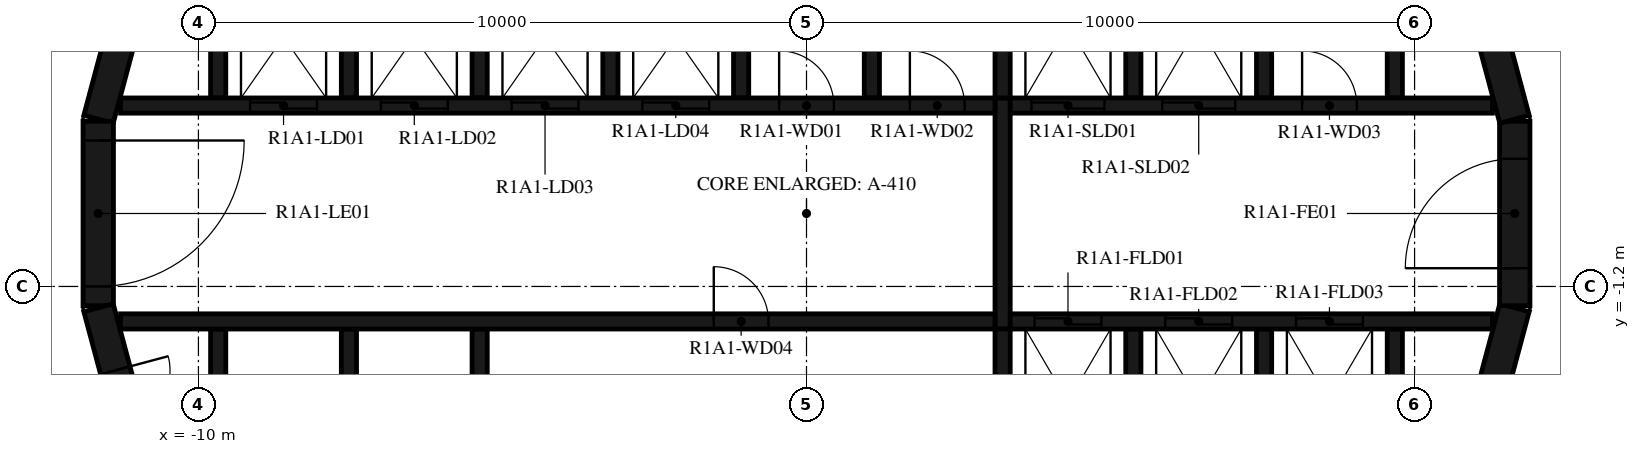
"""IFC4 building model, lengths in metres.
Left out: names, types, materials, properties, quantities, classifications, styles, units other than length and angle.
Written with IfcOpenShell. Run it as: python <this file> out.ifc"""

import sys

from ifc_helpers import new_model, si_unit, direction, frame, frame_2d, origin, place, context, subcontext, project, spatial, polyline, rectangle, outline, extrude, element, fill, save


model = new_model("IFC4")
c1 = context("Model", 3, precision=1e-05, world=origin(), true_north=direction((0.0, 1.0)))
c2 = subcontext(c1, "Body", "Model", "MODEL_VIEW")
j1 = project(units=[si_unit("LENGTHUNIT", "METRE"), si_unit("PLANEANGLEUNIT", "RADIAN")], contexts=[c1])
p1 = place(None, origin())
s1 = spatial("IfcSite", under=j1, at=p1, CompositionType="ELEMENT")
p2 = place(p1, origin())
s2 = spatial("IfcBuilding", under=s1, at=p2, CompositionType="ELEMENT")
p3 = place(p2, frame((0.0, 0.0, 41.9)))
s3 = spatial("IfcBuildingStorey", under=s2, at=p3, CompositionType="ELEMENT", Elevation=41.9)
p4 = place(p3, frame((10.858, -4.479, 0.0), z_axis=(0.0, 0.0, 1.0), x_axis=(0.258734743916, 0.965948410781, 0.0)))
e1 = element("IfcWall", 1, at=p4, inside=s3, PredefinedType="SHEAR", context=c2, shape_type="SweptSolid", body=[
    extrude(rectangle(XDim=3.033, YDim=0.5, at=frame_2d((1.516, 0.0))), origin(), (0.0, 0.0, 1.0), 3.12),
])
p5 = place(p3, frame((11.647, -1.516, 0.0), z_axis=(0.0, 0.0, 1.0), x_axis=(0.0, 1.0, 0.0)))
e2 = element("IfcWall", 2, at=p5, inside=s3, PredefinedType="SHEAR", context=c2, shape_type="SweptSolid", body=[
    extrude(rectangle(XDim=3.033, YDim=0.5, at=frame_2d((1.516, 0.0))), origin(), (0.0, 0.0, 1.0), 3.12),
])
p6 = place(p5, frame((0.616, 0.0, 0.0)))
e3 = element("IfcOpeningElement", 3, at=p6, cuts=e2, PredefinedType="OPENING", context=c2, shape_type="SweptSolid", body=[
    extrude(rectangle(XDim=1.8, YDim=2.1, at=frame_2d((0.9, 1.05))), frame((0.0, 0.26, 0.0), z_axis=(0.0, -1.0, 0.0), x_axis=(1.0, 0.0, 0.0)), (0.0, 0.0, 1.0), 0.52),
])
for number, where, z_axis, x_axis in (
    (4, (11.643, 1.55, 0.0), (0.0, 0.0, 1.0), (-0.259, 0.966, 0.0)),
    (5, (-10.858, 4.479, 0.0), (0.0, 0.0, 1.0), (-0.259, -0.966, 0.0)),
):
    element("IfcWall", number, at=place(p3, frame(where, z_axis=z_axis, x_axis=x_axis)), inside=s3, PredefinedType="SHEAR", context=c2, shape_type="SweptSolid", body=[
        extrude(rectangle(XDim=3.033, YDim=0.5, at=frame_2d((1.516, 0.0))), origin(), (0.0, 0.0, 1.0), 3.12),
    ])
p7 = place(p3, frame((-11.647, 1.516, 0.0), z_axis=(0.0, 0.0, 1.0), x_axis=(0.0, -1.0, 0.0)))
e6 = element("IfcWall", 6, at=p7, inside=s3, PredefinedType="SHEAR", context=c2, shape_type="SweptSolid", body=[
    extrude(rectangle(XDim=3.033, YDim=0.5, at=frame_2d((1.516, 0.0))), origin(), (0.0, 0.0, 1.0), 3.12),
])
p8 = place(p7, frame((0.316, 0.0, 0.0)))
e7 = element("IfcOpeningElement", 7, at=p8, cuts=e6, PredefinedType="OPENING", context=c2, shape_type="SweptSolid", body=[
    extrude(rectangle(XDim=2.4, YDim=2.1, at=frame_2d((1.2, 1.05))), frame((0.0, 0.26, 0.0), z_axis=(0.0, -1.0, 0.0), x_axis=(1.0, 0.0, 0.0)), (0.0, 0.0, 1.0), 0.52),
])
p9 = place(p3, frame((-11.643, -1.55, 0.0), z_axis=(0.0, 0.0, 1.0), x_axis=(0.258734743916, -0.965948410781, 0.0)))
e8 = element("IfcWall", 8, at=p9, inside=s3, PredefinedType="SHEAR", context=c2, shape_type="SweptSolid", body=[
    extrude(rectangle(XDim=3.033, YDim=0.5, at=frame_2d((1.516, 0.0))), origin(), (0.0, 0.0, 1.0), 3.12),
])
p10 = place(p9, frame((1.066, 0.0, 0.0)))
e9 = element("IfcOpeningElement", 9, at=p10, cuts=e8, PredefinedType="OPENING", context=c2, shape_type="SweptSolid", body=[
    extrude(rectangle(XDim=0.9, YDim=2.1, at=frame_2d((0.45, 1.05))), frame((0.0, 0.26, 0.0), z_axis=(0.0, -1.0, 0.0), x_axis=(1.0, 0.0, 0.0)), (0.0, 0.0, 1.0), 0.52),
])
p11 = place(p3, origin())
e10 = element("IfcWall", 10, at=p11, inside=s3, PredefinedType="SHEAR", context=c2, shape_type="SweptSolid", body=[
    extrude(outline(polyline([(-9.55, 4.8), (-7.65, 4.8), (-7.65, 1.9), (-7.4, 1.9), (-7.4, 4.8), (-5.5, 4.8), (-5.5, 1.9), (-5.25, 1.9), (-5.25, 4.8), (-3.35, 4.8), (-3.35, 1.9), (-3.1, 1.9), (-3.1, 4.8), (-1.2, 4.8), (-1.2, 1.9), (-0.95, 1.9), (-0.95, 4.8), (0.95, 4.8), (0.95, 1.9), (1.2, 1.9), (1.2, 4.8), (3.1, 4.8), (3.1, 1.9), (3.35, 1.9), (3.35, 4.8), (5.25, 4.8), (5.25, 1.9), (5.5, 1.9), (5.5, 4.8), (7.4, 4.8), (7.4, 1.9), (7.65, 1.9), (7.65, 4.8), (9.55, 4.8), (9.55, 1.9), (9.8, 1.9), (9.8, 4.8), (9.8, 5.05), (-9.8, 5.05), (-9.8, 4.8), (-9.8, 1.9), (-9.55, 1.9), (-9.55, 4.8)])), origin(), (0.0, 0.0, 1.0), 3.12),
])
p12 = place(p3, origin())
e11 = element("IfcWall", 11, at=p12, inside=s3, PredefinedType="SHEAR", context=c2, shape_type="SweptSolid", body=[
    extrude(outline(polyline([(9.8, -5.05), (9.8, -4.8), (9.8, -1.9), (9.55, -1.9), (9.55, -4.8), (7.65, -4.8), (7.65, -1.9), (7.4, -1.9), (7.4, -4.8), (5.5, -4.8), (5.5, -1.9), (5.25, -1.9), (5.25, -4.8), (3.35, -4.8), (3.35, -1.9), (3.1, -1.9), (3.1, -4.8), (-5.25, -4.8), (-5.25, -1.9), (-5.5, -1.9), (-5.5, -4.8), (-7.4, -4.8), (-7.4, -1.9), (-7.65, -1.9), (-7.65, -4.8), (-9.55, -4.8), (-9.55, -1.9), (-9.8, -1.9), (-9.8, -4.8), (-9.8, -5.05), (9.8, -5.05)])), origin(), (0.0, 0.0, 1.0), 3.12),
])
p13 = place(p3, frame((-11.28, 1.775, 0.0), z_axis=(0.0, 0.0, 1.0), x_axis=(1.0, 0.0, 0.0)))
e12 = element("IfcWall", 12, at=p13, inside=s3, PredefinedType="SHEAR", context=c2, shape_type="SweptSolid", body=[
    extrude(rectangle(XDim=14.38, YDim=0.25, at=frame_2d((7.19, 0.0))), origin(), (0.0, 0.0, 1.0), 3.12),
])
p14 = place(p13, frame((2.13, 0.0, 0.0)))
e13 = element("IfcOpeningElement", 13, at=p14, cuts=e12, PredefinedType="OPENING", context=c2, shape_type="SweptSolid", body=[
    extrude(rectangle(XDim=1.1, YDim=2.1, at=frame_2d((0.55, 1.05))), frame((0.0, 0.135, 0.0), z_axis=(0.0, -1.0, 0.0), x_axis=(1.0, 0.0, 0.0)), (0.0, 0.0, 1.0), 0.27),
])
p15 = place(p13, frame((4.28, 0.0, 0.0)))
e14 = element("IfcOpeningElement", 14, at=p15, cuts=e12, PredefinedType="OPENING", context=c2, shape_type="SweptSolid", body=[
    extrude(rectangle(XDim=1.1, YDim=2.1, at=frame_2d((0.55, 1.05))), frame((0.0, 0.135, 0.0), z_axis=(0.0, -1.0, 0.0), x_axis=(1.0, 0.0, 0.0)), (0.0, 0.0, 1.0), 0.27),
])
p16 = place(p13, frame((6.43, 0.0, 0.0)))
e15 = element("IfcOpeningElement", 15, at=p16, cuts=e12, PredefinedType="OPENING", context=c2, shape_type="SweptSolid", body=[
    extrude(rectangle(XDim=1.1, YDim=2.1, at=frame_2d((0.55, 1.05))), frame((0.0, 0.135, 0.0), z_axis=(0.0, -1.0, 0.0), x_axis=(1.0, 0.0, 0.0)), (0.0, 0.0, 1.0), 0.27),
])
p17 = place(p13, frame((8.58, 0.0, 0.0)))
e16 = element("IfcOpeningElement", 16, at=p17, cuts=e12, PredefinedType="OPENING", context=c2, shape_type="SweptSolid", body=[
    extrude(rectangle(XDim=1.1, YDim=2.1, at=frame_2d((0.55, 1.05))), frame((0.0, 0.135, 0.0), z_axis=(0.0, -1.0, 0.0), x_axis=(1.0, 0.0, 0.0)), (0.0, 0.0, 1.0), 0.27),
])
p18 = place(p13, frame((10.83, 0.0, 0.0)))
e17 = element("IfcOpeningElement", 17, at=p18, cuts=e12, PredefinedType="OPENING", context=c2, shape_type="SweptSolid", body=[
    extrude(rectangle(XDim=0.9, YDim=2.1, at=frame_2d((0.45, 1.05))), frame((0.0, 0.135, 0.0), z_axis=(0.0, -1.0, 0.0), x_axis=(1.0, 0.0, 0.0)), (0.0, 0.0, 1.0), 0.27),
])
p19 = place(p13, frame((12.98, 0.0, 0.0)))
e18 = element("IfcOpeningElement", 18, at=p19, cuts=e12, PredefinedType="OPENING", context=c2, shape_type="SweptSolid", body=[
    extrude(rectangle(XDim=0.9, YDim=2.1, at=frame_2d((0.45, 1.05))), frame((0.0, 0.135, 0.0), z_axis=(0.0, -1.0, 0.0), x_axis=(1.0, 0.0, 0.0)), (0.0, 0.0, 1.0), 0.27),
])
p20 = place(p3, frame((3.35, 1.775, 0.0), z_axis=(0.0, 0.0, 1.0), x_axis=(1.0, 0.0, 0.0)))
e19 = element("IfcWall", 19, at=p20, inside=s3, PredefinedType="SHEAR", context=c2, shape_type="SweptSolid", body=[
    extrude(rectangle(XDim=7.93, YDim=0.25, at=frame_2d((3.965, 0.0))), origin(), (0.0, 0.0, 1.0), 3.12),
])
p21 = place(p20, frame((0.35, 0.0, 0.0)))
e20 = element("IfcOpeningElement", 20, at=p21, cuts=e19, PredefinedType="OPENING", context=c2, shape_type="SweptSolid", body=[
    extrude(rectangle(XDim=1.2, YDim=2.4, at=frame_2d((0.6, 1.2))), frame((0.0, 0.135, 0.0), z_axis=(0.0, -1.0, 0.0), x_axis=(1.0, 0.0, 0.0)), (0.0, 0.0, 1.0), 0.27),
])
p22 = place(p20, frame((2.5, 0.0, 0.0)))
e21 = element("IfcOpeningElement", 21, at=p22, cuts=e19, PredefinedType="OPENING", context=c2, shape_type="SweptSolid", body=[
    extrude(rectangle(XDim=1.2, YDim=2.4, at=frame_2d((0.6, 1.2))), frame((0.0, 0.135, 0.0), z_axis=(0.0, -1.0, 0.0), x_axis=(1.0, 0.0, 0.0)), (0.0, 0.0, 1.0), 0.27),
])
p23 = place(p20, frame((4.8, 0.0, 0.0)))
e22 = element("IfcOpeningElement", 22, at=p23, cuts=e19, PredefinedType="OPENING", context=c2, shape_type="SweptSolid", body=[
    extrude(rectangle(XDim=0.9, YDim=2.1, at=frame_2d((0.45, 1.05))), frame((0.0, 0.135, 0.0), z_axis=(0.0, -1.0, 0.0), x_axis=(1.0, 0.0, 0.0)), (0.0, 0.0, 1.0), 0.27),
])
p24 = place(p3, frame((-11.28, -1.775, 0.0), z_axis=(0.0, 0.0, 1.0), x_axis=(1.0, 0.0, 0.0)))
e23 = element("IfcWall", 23, at=p24, inside=s3, PredefinedType="SHEAR", context=c2, shape_type="SweptSolid", body=[
    extrude(rectangle(XDim=14.38, YDim=0.25, at=frame_2d((7.19, 0.0))), origin(), (0.0, 0.0, 1.0), 3.12),
])
p25 = place(p24, frame((9.755, 0.0, 0.0)))
e24 = element("IfcOpeningElement", 24, at=p25, cuts=e23, PredefinedType="OPENING", context=c2, shape_type="SweptSolid", body=[
    extrude(rectangle(XDim=0.9, YDim=2.1, at=frame_2d((0.45, 1.05))), frame((0.0, 0.135, 0.0), z_axis=(0.0, -1.0, 0.0), x_axis=(1.0, 0.0, 0.0)), (0.0, 0.0, 1.0), 0.27),
])
p26 = place(p3, frame((3.35, -1.775, 0.0), z_axis=(0.0, 0.0, 1.0), x_axis=(1.0, 0.0, 0.0)))
e25 = element("IfcWall", 25, at=p26, inside=s3, PredefinedType="SHEAR", context=c2, shape_type="SweptSolid", body=[
    extrude(rectangle(XDim=7.93, YDim=0.25, at=frame_2d((3.965, 0.0))), origin(), (0.0, 0.0, 1.0), 3.12),
])
p27 = place(p26, frame((0.4, 0.0, 0.0)))
e26 = element("IfcOpeningElement", 26, at=p27, cuts=e25, PredefinedType="OPENING", context=c2, shape_type="SweptSolid", body=[
    extrude(rectangle(XDim=1.1, YDim=2.4, at=frame_2d((0.55, 1.2))), frame((0.0, 0.135, 0.0), z_axis=(0.0, -1.0, 0.0), x_axis=(1.0, 0.0, 0.0)), (0.0, 0.0, 1.0), 0.27),
])
p28 = place(p26, frame((2.55, 0.0, 0.0)))
e27 = element("IfcOpeningElement", 27, at=p28, cuts=e25, PredefinedType="OPENING", context=c2, shape_type="SweptSolid", body=[
    extrude(rectangle(XDim=1.1, YDim=2.4, at=frame_2d((0.55, 1.2))), frame((0.0, 0.135, 0.0), z_axis=(0.0, -1.0, 0.0), x_axis=(1.0, 0.0, 0.0)), (0.0, 0.0, 1.0), 0.27),
])
p29 = place(p26, frame((4.7, 0.0, 0.0)))
e28 = element("IfcOpeningElement", 28, at=p29, cuts=e25, PredefinedType="OPENING", context=c2, shape_type="SweptSolid", body=[
    extrude(rectangle(XDim=1.1, YDim=2.4, at=frame_2d((0.55, 1.2))), frame((0.0, 0.135, 0.0), z_axis=(0.0, -1.0, 0.0), x_axis=(1.0, 0.0, 0.0)), (0.0, 0.0, 1.0), 0.27),
])
p30 = place(p3, frame((3.225, -1.9, 0.0), z_axis=(0.0, 0.0, 1.0), x_axis=(0.0, 1.0, 0.0)))
e29 = element("IfcWall", 29, at=p30, inside=s3, PredefinedType="SHEAR", context=c2, shape_type="SweptSolid", body=[
    extrude(rectangle(XDim=3.8, YDim=0.25, at=frame_2d((1.9, 0.0))), origin(), (0.0, 0.0, 1.0), 3.12),
])
p31 = place(p8, origin())
e30 = element("IfcDoor", 30, at=p31, inside=s3, OperationType="DOUBLE_DOOR_SINGLE_SWING", PredefinedType="DOOR", context=c2, shape_type="SweptSolid", body=[
    extrude(rectangle(XDim=2.4, YDim=2.1, at=frame_2d((1.2, 1.05))), frame((0.0, 0.025, 0.0), z_axis=(0.0, -1.0, 0.0), x_axis=(1.0, 0.0, 0.0)), (0.0, 0.0, 1.0), 0.05),
])
fill(e7, e30)
p32 = place(p6, origin())
e31 = element("IfcDoor", 31, at=p32, inside=s3, OperationType="DOUBLE_DOOR_SINGLE_SWING", PredefinedType="DOOR", context=c2, shape_type="SweptSolid", body=[
    extrude(rectangle(XDim=1.8, YDim=2.1, at=frame_2d((0.9, 1.05))), frame((0.0, 0.025, 0.0), z_axis=(0.0, -1.0, 0.0), x_axis=(1.0, 0.0, 0.0)), (0.0, 0.0, 1.0), 0.05),
])
fill(e3, e31)
p33 = place(p14, origin())
e32 = element("IfcDoor", 32, at=p33, inside=s3, OperationType="DOUBLE_DOOR_SLIDING", PredefinedType="DOOR", context=c2, shape_type="SweptSolid", body=[
    extrude(rectangle(XDim=1.1, YDim=2.1, at=frame_2d((0.55, 1.05))), frame((0.0, 0.025, 0.0), z_axis=(0.0, -1.0, 0.0), x_axis=(1.0, 0.0, 0.0)), (0.0, 0.0, 1.0), 0.05),
])
fill(e13, e32)
p34 = place(p15, origin())
e33 = element("IfcDoor", 33, at=p34, inside=s3, OperationType="DOUBLE_DOOR_SLIDING", PredefinedType="DOOR", context=c2, shape_type="SweptSolid", body=[
    extrude(rectangle(XDim=1.1, YDim=2.1, at=frame_2d((0.55, 1.05))), frame((0.0, 0.025, 0.0), z_axis=(0.0, -1.0, 0.0), x_axis=(1.0, 0.0, 0.0)), (0.0, 0.0, 1.0), 0.05),
])
fill(e14, e33)
p35 = place(p16, origin())
e34 = element("IfcDoor", 34, at=p35, inside=s3, OperationType="DOUBLE_DOOR_SLIDING", PredefinedType="DOOR", context=c2, shape_type="SweptSolid", body=[
    extrude(rectangle(XDim=1.1, YDim=2.1, at=frame_2d((0.55, 1.05))), frame((0.0, 0.025, 0.0), z_axis=(0.0, -1.0, 0.0), x_axis=(1.0, 0.0, 0.0)), (0.0, 0.0, 1.0), 0.05),
])
fill(e15, e34)
p36 = place(p17, origin())
e35 = element("IfcDoor", 35, at=p36, inside=s3, OperationType="DOUBLE_DOOR_SLIDING", PredefinedType="DOOR", context=c2, shape_type="SweptSolid", body=[
    extrude(rectangle(XDim=1.1, YDim=2.1, at=frame_2d((0.55, 1.05))), frame((0.0, 0.025, 0.0), z_axis=(0.0, -1.0, 0.0), x_axis=(1.0, 0.0, 0.0)), (0.0, 0.0, 1.0), 0.05),
])
fill(e16, e35)
p37 = place(p21, origin())
e36 = element("IfcDoor", 36, at=p37, inside=s3, OperationType="DOUBLE_DOOR_SLIDING", PredefinedType="DOOR", context=c2, shape_type="SweptSolid", body=[
    extrude(rectangle(XDim=1.2, YDim=2.4, at=frame_2d((0.6, 1.2))), frame((0.0, 0.025, 0.0), z_axis=(0.0, -1.0, 0.0), x_axis=(1.0, 0.0, 0.0)), (0.0, 0.0, 1.0), 0.05),
])
fill(e20, e36)
p38 = place(p22, origin())
e37 = element("IfcDoor", 37, at=p38, inside=s3, OperationType="DOUBLE_DOOR_SLIDING", PredefinedType="DOOR", context=c2, shape_type="SweptSolid", body=[
    extrude(rectangle(XDim=1.2, YDim=2.4, at=frame_2d((0.6, 1.2))), frame((0.0, 0.025, 0.0), z_axis=(0.0, -1.0, 0.0), x_axis=(1.0, 0.0, 0.0)), (0.0, 0.0, 1.0), 0.05),
])
fill(e21, e37)
p39 = place(p27, origin())
e38 = element("IfcDoor", 38, at=p39, inside=s3, OperationType="DOUBLE_DOOR_SLIDING", PredefinedType="DOOR", context=c2, shape_type="SweptSolid", body=[
    extrude(rectangle(XDim=1.1, YDim=2.4, at=frame_2d((0.55, 1.2))), frame((0.0, 0.025, 0.0), z_axis=(0.0, -1.0, 0.0), x_axis=(1.0, 0.0, 0.0)), (0.0, 0.0, 1.0), 0.05),
])
fill(e26, e38)
p40 = place(p28, origin())
e39 = element("IfcDoor", 39, at=p40, inside=s3, OperationType="DOUBLE_DOOR_SLIDING", PredefinedType="DOOR", context=c2, shape_type="SweptSolid", body=[
    extrude(rectangle(XDim=1.1, YDim=2.4, at=frame_2d((0.55, 1.2))), frame((0.0, 0.025, 0.0), z_axis=(0.0, -1.0, 0.0), x_axis=(1.0, 0.0, 0.0)), (0.0, 0.0, 1.0), 0.05),
])
fill(e27, e39)
p41 = place(p29, origin())
e40 = element("IfcDoor", 40, at=p41, inside=s3, OperationType="DOUBLE_DOOR_SLIDING", PredefinedType="DOOR", context=c2, shape_type="SweptSolid", body=[
    extrude(rectangle(XDim=1.1, YDim=2.4, at=frame_2d((0.55, 1.2))), frame((0.0, 0.025, 0.0), z_axis=(0.0, -1.0, 0.0), x_axis=(1.0, 0.0, 0.0)), (0.0, 0.0, 1.0), 0.05),
])
fill(e28, e40)
p42 = place(p18, origin())
e41 = element("IfcDoor", 41, at=p42, inside=s3, OperationType="SINGLE_SWING_RIGHT", PredefinedType="DOOR", context=c2, shape_type="SweptSolid", body=[
    extrude(rectangle(XDim=0.9, YDim=2.1, at=frame_2d((0.45, 1.05))), frame((0.0, 0.025, 0.0), z_axis=(0.0, -1.0, 0.0), x_axis=(1.0, 0.0, 0.0)), (0.0, 0.0, 1.0), 0.05),
])
fill(e17, e41)
p43 = place(p19, origin())
e42 = element("IfcDoor", 42, at=p43, inside=s3, OperationType="SINGLE_SWING_LEFT", PredefinedType="DOOR", context=c2, shape_type="SweptSolid", body=[
    extrude(rectangle(XDim=0.9, YDim=2.1, at=frame_2d((0.45, 1.05))), frame((0.0, 0.025, 0.0), z_axis=(0.0, -1.0, 0.0), x_axis=(1.0, 0.0, 0.0)), (0.0, 0.0, 1.0), 0.05),
])
fill(e18, e42)
p44 = place(p23, origin())
e43 = element("IfcDoor", 43, at=p44, inside=s3, OperationType="SINGLE_SWING_RIGHT", PredefinedType="DOOR", context=c2, shape_type="SweptSolid", body=[
    extrude(rectangle(XDim=0.9, YDim=2.1, at=frame_2d((0.45, 1.05))), frame((0.0, 0.025, 0.0), z_axis=(0.0, -1.0, 0.0), x_axis=(1.0, 0.0, 0.0)), (0.0, 0.0, 1.0), 0.05),
])
fill(e22, e43)
p45 = place(p25, origin())
e44 = element("IfcDoor", 44, at=p45, inside=s3, OperationType="SINGLE_SWING_LEFT", PredefinedType="DOOR", context=c2, shape_type="SweptSolid", body=[
    extrude(rectangle(XDim=0.9, YDim=2.1, at=frame_2d((0.45, 1.05))), frame((0.0, 0.025, 0.0), z_axis=(0.0, -1.0, 0.0), x_axis=(1.0, 0.0, 0.0)), (0.0, 0.0, 1.0), 0.05),
])
fill(e24, e44)
p46 = place(p10, origin())
e45 = element("IfcDoor", 45, at=p46, inside=s3, OperationType="SINGLE_SWING_RIGHT", PredefinedType="DOOR", context=c2, shape_type="SweptSolid", body=[
    extrude(rectangle(XDim=0.9, YDim=2.1, at=frame_2d((0.45, 1.05))), frame((0.0, 0.025, 0.0), z_axis=(0.0, -1.0, 0.0), x_axis=(1.0, 0.0, 0.0)), (0.0, 0.0, 1.0), 0.05),
])
fill(e9, e45)
save(model, sys.argv[1])
